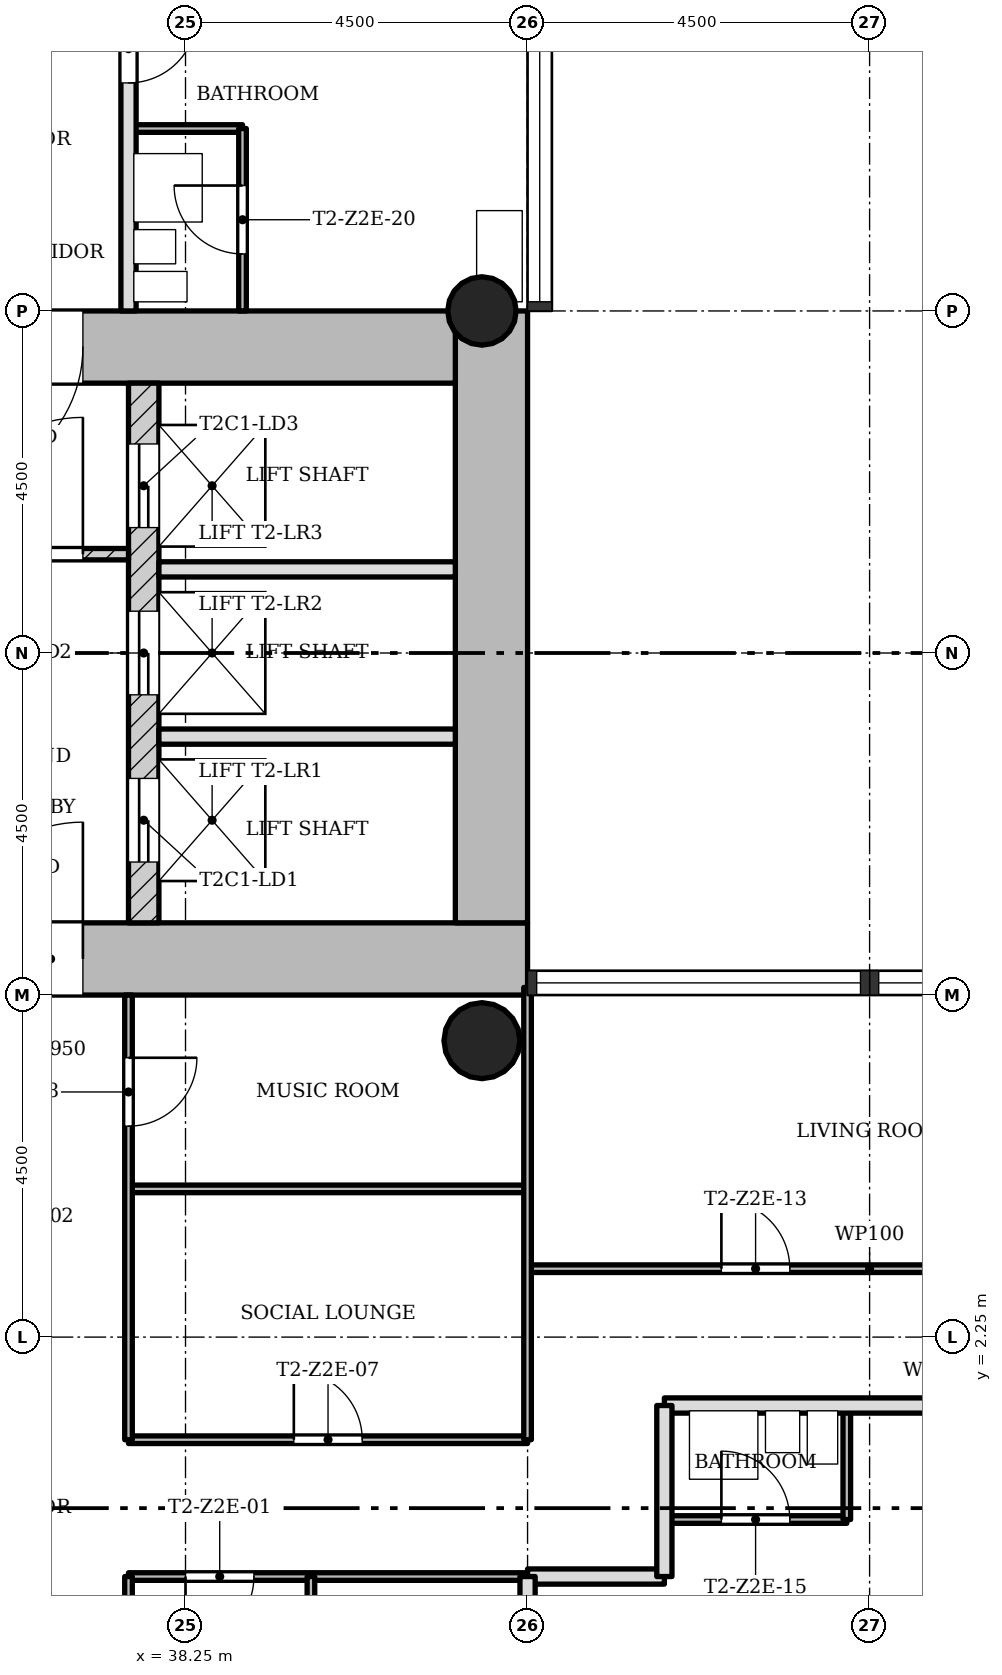
"""IFC4 building model, lengths in metres.
Left out: names, types, materials, properties, quantities, classifications, styles, units other than length and angle.
Written with IfcOpenShell. Run it as: python <this file> out.ifc"""

import sys

from ifc_helpers import new_model, si_unit, direction, frame, frame_2d, origin, origin_2d, place, context, subcontext, project, spatial, rectangle, hollow_circle, extrude, element, fill, save


model = new_model("IFC4")
c1 = context("Model", 3, precision=1e-05, world=origin(), true_north=direction((0.0, 1.0)))
c2 = subcontext(c1, "Body", "Model", "MODEL_VIEW")
j1 = project(units=[si_unit("LENGTHUNIT", "METRE"), si_unit("PLANEANGLEUNIT", "RADIAN")], contexts=[c1])
p1 = place(None, origin())
s1 = spatial("IfcSite", under=j1, at=p1, CompositionType="ELEMENT")
p2 = place(p1, origin())
s2 = spatial("IfcBuilding", under=s1, at=p2, CompositionType="ELEMENT")
p3 = place(p2, frame((0.0, 0.0, 103.8)))
s3 = spatial("IfcBuildingStorey", under=s2, at=p3, CompositionType="ELEMENT", Elevation=103.8)
p4 = place(p3, frame((30.2, 7.225, 0.0), z_axis=(0.0, 0.0, 1.0), x_axis=(1.0, 0.0, 0.0)))
e1 = element("IfcWall", 1, at=p4, inside=s3, PredefinedType="SHEAR", context=c2, shape_type="SweptSolid", body=[
    extrude(rectangle(XDim=12.55, YDim=0.95, at=frame_2d((6.275, 0.0))), origin(), (0.0, 0.0, 1.0), 3.4),
])
p5 = place(p4, frame((4.9, 0.0, 0.0)))
e2 = element("IfcOpeningElement", 2, at=p5, cuts=e1, PredefinedType="OPENING", context=c2, shape_type="SweptSolid", body=[
    extrude(rectangle(XDim=1.8, YDim=2.1, at=frame_2d((0.9, 1.05))), frame((0.0, 0.485, 0.0), z_axis=(0.0, -1.0, 0.0), x_axis=(1.0, 0.0, 0.0)), (0.0, 0.0, 1.0), 0.97),
])
p6 = place(p3, frame((42.275, 7.7, 0.0), z_axis=(0.0, 0.0, 1.0), x_axis=(0.0, 1.0, 0.0)))
e3 = element("IfcWall", 3, at=p6, inside=s3, PredefinedType="SHEAR", context=c2, shape_type="SweptSolid", body=[
    extrude(rectangle(XDim=8.05, YDim=0.95, at=frame_2d((4.025, 0.0))), origin(), (0.0, 0.0, 1.0), 3.4),
])
p7 = place(p3, frame((41.8, 15.275, 0.0), z_axis=(0.0, 0.0, 1.0), x_axis=(-1.0, 0.0, 0.0)))
e4 = element("IfcWall", 4, at=p7, inside=s3, PredefinedType="SHEAR", context=c2, shape_type="SweptSolid", body=[
    extrude(rectangle(XDim=12.55, YDim=0.95, at=frame_2d((6.275, 0.0))), origin(), (0.0, 0.0, 1.0), 3.4),
])
p8 = place(p7, frame((4.9, 0.0, 0.0)))
e5 = element("IfcOpeningElement", 5, at=p8, cuts=e4, PredefinedType="OPENING", context=c2, shape_type="SweptSolid", body=[
    extrude(rectangle(XDim=1.8, YDim=2.1, at=frame_2d((0.9, 1.05))), frame((0.0, 0.485, 0.0), z_axis=(0.0, -1.0, 0.0), x_axis=(1.0, 0.0, 0.0)), (0.0, 0.0, 1.0), 0.97),
])
p9 = place(p3, frame((37.7, 7.7, 0.0), z_axis=(0.0, 0.0, 1.0), x_axis=(0.0, 1.0, 0.0)))
e6 = element("IfcWall", 6, at=p9, inside=s3, PredefinedType="SHEAR", context=c2, shape_type="SweptSolid", body=[
    extrude(rectangle(XDim=7.1, YDim=0.4, at=frame_2d((3.55, 0.0))), origin(), (0.0, 0.0, 1.0), 3.4),
])
p10 = place(p9, frame((0.8, 0.0, 0.0)))
e7 = element("IfcOpeningElement", 7, at=p10, cuts=e6, PredefinedType="OPENING", context=c2, shape_type="SweptSolid", body=[
    extrude(rectangle(XDim=1.1, YDim=2.1, at=frame_2d((0.55, 1.05))), frame((0.0, 0.21, 0.0), z_axis=(0.0, -1.0, 0.0), x_axis=(1.0, 0.0, 0.0)), (0.0, 0.0, 1.0), 0.42),
])
p11 = place(p9, frame((3.0, 0.0, 0.0)))
e8 = element("IfcOpeningElement", 8, at=p11, cuts=e6, PredefinedType="OPENING", context=c2, shape_type="SweptSolid", body=[
    extrude(rectangle(XDim=1.1, YDim=2.1, at=frame_2d((0.55, 1.05))), frame((0.0, 0.21, 0.0), z_axis=(0.0, -1.0, 0.0), x_axis=(1.0, 0.0, 0.0)), (0.0, 0.0, 1.0), 0.42),
])
p12 = place(p9, frame((5.2, 0.0, 0.0)))
e9 = element("IfcOpeningElement", 9, at=p12, cuts=e6, PredefinedType="OPENING", context=c2, shape_type="SweptSolid", body=[
    extrude(rectangle(XDim=1.1, YDim=2.1, at=frame_2d((0.55, 1.05))), frame((0.0, 0.21, 0.0), z_axis=(0.0, -1.0, 0.0), x_axis=(1.0, 0.0, 0.0)), (0.0, 0.0, 1.0), 0.42),
])
p13 = place(p3, frame((42.15, 15.75, 0.0), z_axis=(0.0, 0.0, 1.0), x_axis=(1.0, 0.0, 0.0)))
e10 = element("IfcColumn", 10, at=p13, inside=s3, PredefinedType="COLUMN", context=c2, shape_type="SweptSolid", body=[
    extrude(hollow_circle(Radius=0.45, WallThickness=0.032, at=origin_2d()), origin(), (0.0, 0.0, 1.0), 3.4),
])
p14 = place(p3, frame((42.15, 6.15, 0.0), z_axis=(0.0, 0.0, 1.0), x_axis=(1.0, 0.0, 0.0)))
e11 = element("IfcColumn", 11, at=p14, inside=s3, PredefinedType="COLUMN", context=c2, shape_type="SweptSolid", body=[
    extrude(hollow_circle(Radius=0.5, WallThickness=0.036, at=origin_2d()), origin(), (0.0, 0.0, 1.0), 3.4),
])
p15 = place(p3, frame((37.5, 12.55, 0.0), z_axis=(0.0, 0.0, 1.0), x_axis=(-1.0, 0.0, 0.0)))
e12 = element("IfcWall", 12, at=p15, inside=s3, PredefinedType="PARTITIONING", context=c2, shape_type="SweptSolid", body=[
    extrude(rectangle(XDim=3.0, YDim=0.15, at=frame_2d((1.5, 0.0))), origin(), (0.0, 0.0, 1.0), 3.0),
])
p16 = place(p15, frame((0.6, 0.0, 0.0)))
e13 = element("IfcOpeningElement", 13, at=p16, cuts=e12, PredefinedType="OPENING", context=c2, shape_type="SweptSolid", body=[
    extrude(rectangle(XDim=1.8, YDim=2.1, at=frame_2d((0.9, 1.05))), frame((0.0, 0.085, 0.0), z_axis=(0.0, -1.0, 0.0), x_axis=(1.0, 0.0, 0.0)), (0.0, 0.0, 1.0), 0.17),
])
for number, where, z_axis, x_axis in (
    (14, (41.8, 10.15, 0.0), (0.0, 0.0, 1.0), (-1.0, 0.0, 0.0)),
    (15, (41.8, 12.35, 0.0), (0.0, 0.0, 1.0), (-1.0, 0.0, 0.0)),
):
    element("IfcWall", number, at=place(p3, frame(where, z_axis=z_axis, x_axis=x_axis)), inside=s3, PredefinedType="SOLIDWALL", context=c2, shape_type="SweptSolid", body=[
        extrude(rectangle(XDim=3.9, YDim=0.2, at=frame_2d((1.95, 0.0))), origin(), (0.0, 0.0, 1.0), 3.0),
    ])
p17 = place(p3, frame((42.75, -0.9, 0.0), z_axis=(0.0, 0.0, 1.0), x_axis=(-1.0, 0.0, 0.0)))
e16 = element("IfcWall", 16, at=p17, inside=s3, PredefinedType="PARTITIONING", context=c2, shape_type="SweptSolid", body=[
    extrude(rectangle(XDim=5.25, YDim=0.1, at=frame_2d((2.625, 0.0))), origin(), (0.0, 0.0, 1.0), 3.0),
])
p18 = place(p17, frame((3.6, 0.0, 0.0)))
e17 = element("IfcOpeningElement", 17, at=p18, cuts=e16, PredefinedType="OPENING", context=c2, shape_type="SweptSolid", body=[
    extrude(rectangle(XDim=0.9, YDim=2.1, at=frame_2d((0.45, 1.05))), frame((0.0, 0.06, 0.0), z_axis=(0.0, -1.0, 0.0), x_axis=(1.0, 0.0, 0.0)), (0.0, 0.0, 1.0), 0.12),
])
p19 = place(p3, frame((44.55, -0.9, 0.0), z_axis=(0.0, 0.0, 1.0), x_axis=(-1.0, 0.0, 0.0)))
e18 = element("IfcWall", 18, at=p19, inside=s3, PredefinedType="SOLIDWALL", context=c2, shape_type="SweptSolid", body=[
    extrude(rectangle(XDim=1.8, YDim=0.2, at=frame_2d((0.9, 0.0))), origin(), (0.0, 0.0, 1.0), 3.0),
])
p20 = place(p3, frame((46.95, -0.15, 0.0), z_axis=(0.0, 0.0, 1.0), x_axis=(-1.0, 0.0, 0.0)))
e19 = element("IfcWall", 19, at=p20, inside=s3, PredefinedType="PARTITIONING", context=c2, shape_type="SweptSolid", body=[
    extrude(rectangle(XDim=2.4, YDim=0.1, at=frame_2d((1.2, 0.0))), origin(), (0.0, 0.0, 1.0), 3.0),
])
p21 = place(p20, frame((0.75, 0.0, 0.0)))
e20 = element("IfcOpeningElement", 20, at=p21, cuts=e19, PredefinedType="OPENING", context=c2, shape_type="SweptSolid", body=[
    extrude(rectangle(XDim=0.9, YDim=2.1, at=frame_2d((0.45, 1.05))), frame((0.0, 0.06, 0.0), z_axis=(0.0, -1.0, 0.0), x_axis=(1.0, 0.0, 0.0)), (0.0, 0.0, 1.0), 0.12),
])
p22 = place(p3, frame((42.75, 0.9, 0.0), z_axis=(0.0, 0.0, 1.0), x_axis=(-1.0, 0.0, 0.0)))
e21 = element("IfcWall", 21, at=p22, inside=s3, PredefinedType="PARTITIONING", context=c2, shape_type="SweptSolid", body=[
    extrude(rectangle(XDim=5.25, YDim=0.1, at=frame_2d((2.625, 0.0))), origin(), (0.0, 0.0, 1.0), 3.0),
])
p23 = place(p22, frame((2.175, 0.0, 0.0)))
e22 = element("IfcOpeningElement", 22, at=p23, cuts=e21, PredefinedType="OPENING", context=c2, shape_type="SweptSolid", body=[
    extrude(rectangle(XDim=0.9, YDim=2.1, at=frame_2d((0.45, 1.05))), frame((0.0, 0.06, 0.0), z_axis=(0.0, -1.0, 0.0), x_axis=(1.0, 0.0, 0.0)), (0.0, 0.0, 1.0), 0.12),
])
p24 = place(p3, frame((51.75, 1.35, 0.0), z_axis=(0.0, 0.0, 1.0), x_axis=(-1.0, 0.0, 0.0)))
e23 = element("IfcWall", 23, at=p24, inside=s3, PredefinedType="SOLIDWALL", context=c2, shape_type="SweptSolid", body=[
    extrude(rectangle(XDim=7.2, YDim=0.2, at=frame_2d((3.6, 0.0))), origin(), (0.0, 0.0, 1.0), 3.0),
])
p25 = place(p24, frame((1.95, 0.0, 0.0)))
e24 = element("IfcOpeningElement", 24, at=p25, cuts=e23, PredefinedType="OPENING", context=c2, shape_type="SweptSolid", body=[
    extrude(rectangle(XDim=0.9, YDim=2.1, at=frame_2d((0.45, 1.05))), frame((0.0, 0.11, 0.0), z_axis=(0.0, -1.0, 0.0), x_axis=(1.0, 0.0, 0.0)), (0.0, 0.0, 1.0), 0.22),
])
p26 = place(p3, frame((51.75, 3.15, 0.0), z_axis=(0.0, 0.0, 1.0), x_axis=(-1.0, 0.0, 0.0)))
e25 = element("IfcWall", 25, at=p26, inside=s3, PredefinedType="PARTITIONING", context=c2, shape_type="SweptSolid", body=[
    extrude(rectangle(XDim=9.0, YDim=0.1, at=frame_2d((4.5, 0.0))), origin(), (0.0, 0.0, 1.0), 3.0),
])
p27 = place(p26, frame((5.55, 0.0, 0.0)))
e26 = element("IfcOpeningElement", 26, at=p27, cuts=e25, PredefinedType="OPENING", context=c2, shape_type="SweptSolid", body=[
    extrude(rectangle(XDim=0.9, YDim=2.1, at=frame_2d((0.45, 1.05))), frame((0.0, 0.06, 0.0), z_axis=(0.0, -1.0, 0.0), x_axis=(1.0, 0.0, 0.0)), (0.0, 0.0, 1.0), 0.12),
])
p28 = place(p3, frame((42.75, 4.2, 0.0), z_axis=(0.0, 0.0, 1.0), x_axis=(-1.0, 0.0, 0.0)))
e27 = element("IfcWall", 27, at=p28, inside=s3, PredefinedType="PARTITIONING", context=c2, shape_type="SweptSolid", body=[
    extrude(rectangle(XDim=5.25, YDim=0.1, at=frame_2d((2.625, 0.0))), origin(), (0.0, 0.0, 1.0), 3.0),
])
for number, where, z_axis, x_axis in (
    (28, (39.0, 18.15, 0.0), (0.0, 0.0, 1.0), (-1.0, 0.0, 0.0)),
    (29, (46.95, -0.15, 0.0), (0.0, 0.0, 1.0), (0.0, 1.0, 0.0)),
):
    element("IfcWall", number, at=place(p3, frame(where, z_axis=z_axis, x_axis=x_axis)), inside=s3, PredefinedType="PARTITIONING", context=c2, shape_type="SweptSolid", body=[
        extrude(rectangle(XDim=1.5, YDim=0.1, at=frame_2d((0.75, 0.0))), origin(), (0.0, 0.0, 1.0), 3.0),
    ])
p29 = place(p3, frame((44.55, -0.9, 0.0), z_axis=(0.0, 0.0, 1.0), x_axis=(0.0, 1.0, 0.0)))
e30 = element("IfcWall", 30, at=p29, inside=s3, PredefinedType="SOLIDWALL", context=c2, shape_type="SweptSolid", body=[
    extrude(rectangle(XDim=2.25, YDim=0.2, at=frame_2d((1.125, 0.0))), origin(), (0.0, 0.0, 1.0), 3.0),
])
p30 = place(p3, frame((42.75, 0.9, 0.0), z_axis=(0.0, 0.0, 1.0), x_axis=(0.0, 1.0, 0.0)))
e31 = element("IfcWall", 31, at=p30, inside=s3, PredefinedType="PARTITIONING", context=c2, shape_type="SweptSolid", body=[
    extrude(rectangle(XDim=5.95, YDim=0.1, at=frame_2d((2.975, 0.0))), origin(), (0.0, 0.0, 1.0), 3.0),
])
p31 = place(p3, frame((42.75, -6.85, 0.0), z_axis=(0.0, 0.0, 1.0), x_axis=(0.0, 1.0, 0.0)))
e32 = element("IfcWall", 32, at=p31, inside=s3, PredefinedType="SOLIDWALL", context=c2, shape_type="SweptSolid", body=[
    extrude(rectangle(XDim=5.95, YDim=0.2, at=frame_2d((2.975, 0.0))), origin(), (0.0, 0.0, 1.0), 3.0),
])
p32 = place(p3, frame((39.9, -2.7, 0.0), z_axis=(0.0, 0.0, 1.0), x_axis=(0.0, 1.0, 0.0)))
e33 = element("IfcWall", 33, at=p32, inside=s3, PredefinedType="PARTITIONING", context=c2, shape_type="SweptSolid", body=[
    extrude(rectangle(XDim=1.8, YDim=0.1, at=frame_2d((0.9, 0.0))), origin(), (0.0, 0.0, 1.0), 3.0),
])
p33 = place(p3, frame((39.0, 15.75, 0.0), z_axis=(0.0, 0.0, 1.0), x_axis=(0.0, 1.0, 0.0)))
e34 = element("IfcWall", 34, at=p33, inside=s3, PredefinedType="PARTITIONING", context=c2, shape_type="SweptSolid", body=[
    extrude(rectangle(XDim=2.4, YDim=0.1, at=frame_2d((1.2, 0.0))), origin(), (0.0, 0.0, 1.0), 3.0),
])
p34 = place(p33, frame((0.75, 0.0, 0.0)))
e35 = element("IfcOpeningElement", 35, at=p34, cuts=e34, PredefinedType="OPENING", context=c2, shape_type="SweptSolid", body=[
    extrude(rectangle(XDim=0.9, YDim=2.1, at=frame_2d((0.45, 1.05))), frame((0.0, 0.06, 0.0), z_axis=(0.0, -1.0, 0.0), x_axis=(1.0, 0.0, 0.0)), (0.0, 0.0, 1.0), 0.12),
])
p35 = place(p3, frame((37.5, -6.75, 0.0), z_axis=(0.0, 0.0, 1.0), x_axis=(0.0, 1.0, 0.0)))
e36 = element("IfcWall", 36, at=p35, inside=s3, PredefinedType="PARTITIONING", context=c2, shape_type="SweptSolid", body=[
    extrude(rectangle(XDim=5.85, YDim=0.1, at=frame_2d((2.925, 0.0))), origin(), (0.0, 0.0, 1.0), 3.0),
])
p36 = place(p35, frame((1.575, 0.0, 0.0)))
e37 = element("IfcOpeningElement", 37, at=p36, cuts=e36, PredefinedType="OPENING", context=c2, shape_type="SweptSolid", body=[
    extrude(rectangle(XDim=0.9, YDim=2.1, at=frame_2d((0.45, 1.05))), frame((0.0, 0.06, 0.0), z_axis=(0.0, -1.0, 0.0), x_axis=(1.0, 0.0, 0.0)), (0.0, 0.0, 1.0), 0.12),
])
p37 = place(p3, frame((37.5, 0.9, 0.0), z_axis=(0.0, 0.0, 1.0), x_axis=(0.0, 1.0, 0.0)))
e38 = element("IfcWall", 38, at=p37, inside=s3, PredefinedType="PARTITIONING", context=c2, shape_type="SweptSolid", body=[
    extrude(rectangle(XDim=5.85, YDim=0.1, at=frame_2d((2.925, 0.0))), origin(), (0.0, 0.0, 1.0), 3.0),
])
p38 = place(p37, frame((4.125, 0.0, 0.0)))
e39 = element("IfcOpeningElement", 39, at=p38, cuts=e38, PredefinedType="OPENING", context=c2, shape_type="SweptSolid", body=[
    extrude(rectangle(XDim=0.9, YDim=2.1, at=frame_2d((0.45, 1.05))), frame((0.0, 0.06, 0.0), z_axis=(0.0, -1.0, 0.0), x_axis=(1.0, 0.0, 0.0)), (0.0, 0.0, 1.0), 0.12),
])
p39 = place(p3, frame((37.5, 15.75, 0.0), z_axis=(0.0, 0.0, 1.0), x_axis=(0.0, 1.0, 0.0)))
e40 = element("IfcWall", 40, at=p39, inside=s3, PredefinedType="SOLIDWALL", context=c2, shape_type="SweptSolid", body=[
    extrude(rectangle(XDim=4.5, YDim=0.2, at=frame_2d((2.25, 0.0))), origin(), (0.0, 0.0, 1.0), 3.0),
])
p40 = place(p39, frame((3.0, 0.0, 0.0)))
e41 = element("IfcOpeningElement", 41, at=p40, cuts=e40, PredefinedType="OPENING", context=c2, shape_type="SweptSolid", body=[
    extrude(rectangle(XDim=0.9, YDim=2.1, at=frame_2d((0.45, 1.05))), frame((0.0, 0.11, 0.0), z_axis=(0.0, -1.0, 0.0), x_axis=(1.0, 0.0, 0.0)), (0.0, 0.0, 1.0), 0.22),
])
p41 = place(p16, origin())
e42 = element("IfcDoor", 42, at=p41, inside=s3, OperationType="SINGLE_SWING_LEFT", PredefinedType="DOOR", context=c2, shape_type="SweptSolid", body=[
    extrude(rectangle(XDim=1.8, YDim=2.1, at=frame_2d((0.9, 1.05))), frame((0.0, 0.025, 0.0), z_axis=(0.0, -1.0, 0.0), x_axis=(1.0, 0.0, 0.0)), (0.0, 0.0, 1.0), 0.05),
])
fill(e13, e42)
p42 = place(p18, origin())
e43 = element("IfcDoor", 43, at=p42, inside=s3, OperationType="SINGLE_SWING_LEFT", PredefinedType="DOOR", context=c2, shape_type="SweptSolid", body=[
    extrude(rectangle(XDim=0.9, YDim=2.1, at=frame_2d((0.45, 1.05))), frame((0.0, 0.025, 0.0), z_axis=(0.0, -1.0, 0.0), x_axis=(1.0, 0.0, 0.0)), (0.0, 0.0, 1.0), 0.05),
])
fill(e17, e43)
p43 = place(p23, origin())
e44 = element("IfcDoor", 44, at=p43, inside=s3, OperationType="SINGLE_SWING_RIGHT", PredefinedType="DOOR", context=c2, shape_type="SweptSolid", body=[
    extrude(rectangle(XDim=0.9, YDim=2.1, at=frame_2d((0.45, 1.05))), frame((0.0, 0.025, 0.0), z_axis=(0.0, -1.0, 0.0), x_axis=(1.0, 0.0, 0.0)), (0.0, 0.0, 1.0), 0.05),
])
fill(e22, e44)
p44 = place(p38, origin())
e45 = element("IfcDoor", 45, at=p44, inside=s3, OperationType="SINGLE_SWING_RIGHT", PredefinedType="DOOR", context=c2, shape_type="SweptSolid", body=[
    extrude(rectangle(XDim=0.9, YDim=2.1, at=frame_2d((0.45, 1.05))), frame((0.0, 0.025, 0.0), z_axis=(0.0, -1.0, 0.0), x_axis=(1.0, 0.0, 0.0)), (0.0, 0.0, 1.0), 0.05),
])
fill(e39, e45)
p45 = place(p27, origin())
e46 = element("IfcDoor", 46, at=p45, inside=s3, OperationType="SINGLE_SWING_RIGHT", PredefinedType="DOOR", context=c2, shape_type="SweptSolid", body=[
    extrude(rectangle(XDim=0.9, YDim=2.1, at=frame_2d((0.45, 1.05))), frame((0.0, 0.025, 0.0), z_axis=(0.0, -1.0, 0.0), x_axis=(1.0, 0.0, 0.0)), (0.0, 0.0, 1.0), 0.05),
])
fill(e26, e46)
p46 = place(p21, origin())
e47 = element("IfcDoor", 47, at=p46, inside=s3, OperationType="SINGLE_SWING_RIGHT", PredefinedType="DOOR", context=c2, shape_type="SweptSolid", body=[
    extrude(rectangle(XDim=0.9, YDim=2.1, at=frame_2d((0.45, 1.05))), frame((0.0, 0.025, 0.0), z_axis=(0.0, -1.0, 0.0), x_axis=(1.0, 0.0, 0.0)), (0.0, 0.0, 1.0), 0.05),
])
fill(e20, e47)
p47 = place(p40, origin())
e48 = element("IfcDoor", 48, at=p47, inside=s3, OperationType="SINGLE_SWING_RIGHT", PredefinedType="DOOR", context=c2, shape_type="SweptSolid", body=[
    extrude(rectangle(XDim=0.9, YDim=2.1, at=frame_2d((0.45, 1.05))), frame((0.0, 0.025, 0.0), z_axis=(0.0, -1.0, 0.0), x_axis=(1.0, 0.0, 0.0)), (0.0, 0.0, 1.0), 0.05),
])
fill(e41, e48)
p48 = place(p34, origin())
e49 = element("IfcDoor", 49, at=p48, inside=s3, OperationType="SINGLE_SWING_LEFT", PredefinedType="DOOR", context=c2, shape_type="SweptSolid", body=[
    extrude(rectangle(XDim=0.9, YDim=2.1, at=frame_2d((0.45, 1.05))), frame((0.0, 0.025, 0.0), z_axis=(0.0, -1.0, 0.0), x_axis=(1.0, 0.0, 0.0)), (0.0, 0.0, 1.0), 0.05),
])
fill(e35, e49)
p49 = place(p10, origin())
e50 = element("IfcDoor", 50, at=p49, inside=s3, OperationType="SLIDING_TO_LEFT", PredefinedType="DOOR", context=c2, shape_type="SweptSolid", body=[
    extrude(rectangle(XDim=1.1, YDim=2.1, at=frame_2d((0.55, 1.05))), frame((0.0, 0.025, 0.0), z_axis=(0.0, -1.0, 0.0), x_axis=(1.0, 0.0, 0.0)), (0.0, 0.0, 1.0), 0.05),
])
fill(e7, e50)
p50 = place(p11, origin())
e51 = element("IfcDoor", 51, at=p50, inside=s3, OperationType="SLIDING_TO_LEFT", PredefinedType="DOOR", context=c2, shape_type="SweptSolid", body=[
    extrude(rectangle(XDim=1.1, YDim=2.1, at=frame_2d((0.55, 1.05))), frame((0.0, 0.025, 0.0), z_axis=(0.0, -1.0, 0.0), x_axis=(1.0, 0.0, 0.0)), (0.0, 0.0, 1.0), 0.05),
])
fill(e8, e51)
p51 = place(p12, origin())
e52 = element("IfcDoor", 52, at=p51, inside=s3, OperationType="SLIDING_TO_LEFT", PredefinedType="DOOR", context=c2, shape_type="SweptSolid", body=[
    extrude(rectangle(XDim=1.1, YDim=2.1, at=frame_2d((0.55, 1.05))), frame((0.0, 0.025, 0.0), z_axis=(0.0, -1.0, 0.0), x_axis=(1.0, 0.0, 0.0)), (0.0, 0.0, 1.0), 0.05),
])
fill(e9, e52)
p52 = place(p5, origin())
e53 = element("IfcDoor", 53, at=p52, inside=s3, OperationType="SINGLE_SWING_LEFT", PredefinedType="DOOR", context=c2, shape_type="SweptSolid", body=[
    extrude(rectangle(XDim=1.8, YDim=2.1, at=frame_2d((0.9, 1.05))), frame((0.0, 0.025, 0.0), z_axis=(0.0, -1.0, 0.0), x_axis=(1.0, 0.0, 0.0)), (0.0, 0.0, 1.0), 0.05),
])
fill(e2, e53)
p53 = place(p8, origin())
e54 = element("IfcDoor", 54, at=p53, inside=s3, OperationType="SINGLE_SWING_LEFT", PredefinedType="DOOR", context=c2, shape_type="SweptSolid", body=[
    extrude(rectangle(XDim=1.8, YDim=2.1, at=frame_2d((0.9, 1.05))), frame((0.0, 0.025, 0.0), z_axis=(0.0, -1.0, 0.0), x_axis=(1.0, 0.0, 0.0)), (0.0, 0.0, 1.0), 0.05),
])
fill(e5, e54)
save(model, sys.argv[1])
